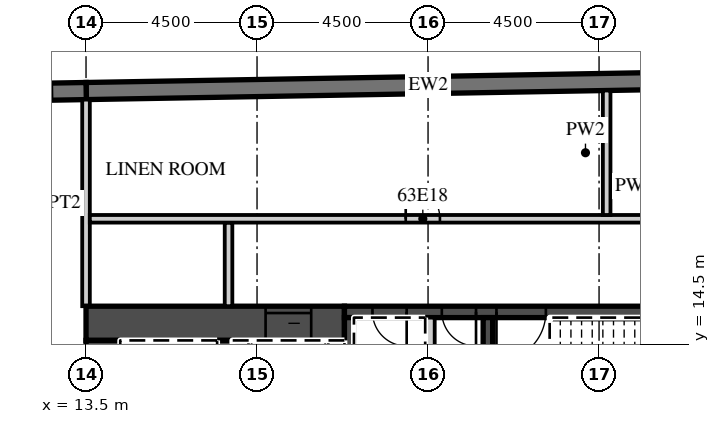
"""IFC4 building model, lengths in metres.
Left out: names, types, materials, properties, quantities, classifications, styles, units other than length and angle.
Written with IfcOpenShell. Run it as: python <this file> out.ifc"""

import sys

from ifc_helpers import new_model, si_unit, direction, frame, frame_2d, origin, place, context, subcontext, project, spatial, rectangle, extrude, element, fill, save


model = new_model("IFC4")
c1 = context("Model", 3, precision=1e-05, world=origin(), true_north=direction((0.0, 1.0)))
c2 = subcontext(c1, "Body", "Model", "MODEL_VIEW")
j1 = project(units=[si_unit("LENGTHUNIT", "METRE"), si_unit("PLANEANGLEUNIT", "RADIAN")], contexts=[c1])
p1 = place(None, origin())
s1 = spatial("IfcSite", under=j1, at=p1, CompositionType="ELEMENT")
p2 = place(p1, origin())
s2 = spatial("IfcBuilding", under=s1, at=p2, CompositionType="ELEMENT")
p3 = place(p2, frame((0.0, 0.0, 254.0)))
s3 = spatial("IfcBuildingStorey", under=s2, at=p3, CompositionType="ELEMENT", Elevation=254.0)
p4 = place(p3, frame((31.504, 21.476, 0.0), z_axis=(0.0, 0.0, 1.0), x_axis=(-0.999847677887, -0.017453395744, 0.0)))
e1 = element("IfcWall", 1, at=p4, inside=s3, PredefinedType="SOLIDWALL", context=c2, shape_type="SweptSolid", body=[
    extrude(rectangle(XDim=18.003, YDim=0.45, at=frame_2d((9.001, 0.0))), origin(), (0.0, 0.0, 1.0), 3.0),
])
p5 = place(p3, frame((13.504, 21.161, 0.0), z_axis=(0.0, 0.0, 1.0), x_axis=(-0.999847763257, -0.017448504532, 0.0)))
e2 = element("IfcWall", 2, at=p5, inside=s3, PredefinedType="SOLIDWALL", context=c2, shape_type="SweptSolid", body=[
    extrude(rectangle(XDim=46.859, YDim=0.45, at=frame_2d((23.43, 0.0))), origin(), (0.0, 0.0, 1.0), 3.0),
])
p6 = place(p5, frame((0.9, 0.0, 0.45)))
e3 = element("IfcOpeningElement", 3, at=p6, cuts=e2, PredefinedType="OPENING", context=c2, shape_type="SweptSolid", body=[
    extrude(rectangle(XDim=2.7, YDim=2.25, at=frame_2d((1.35, 1.125))), frame((0.0, 0.235, 0.0), z_axis=(0.0, -1.0, 0.0), x_axis=(1.0, 0.0, 0.0)), (0.0, 0.0, 1.0), 0.47),
])
p7 = place(p5, frame((5.401, 0.0, 0.45)))
e4 = element("IfcOpeningElement", 4, at=p7, cuts=e2, PredefinedType="OPENING", context=c2, shape_type="SweptSolid", body=[
    extrude(rectangle(XDim=2.7, YDim=2.25, at=frame_2d((1.35, 1.125))), frame((0.0, 0.235, 0.0), z_axis=(0.0, -1.0, 0.0), x_axis=(1.0, 0.0, 0.0)), (0.0, 0.0, 1.0), 0.47),
])
p8 = place(p5, frame((9.902, 0.0, 0.45)))
e5 = element("IfcOpeningElement", 5, at=p8, cuts=e2, PredefinedType="OPENING", context=c2, shape_type="SweptSolid", body=[
    extrude(rectangle(XDim=2.7, YDim=2.25, at=frame_2d((1.35, 1.125))), frame((0.0, 0.235, 0.0), z_axis=(0.0, -1.0, 0.0), x_axis=(1.0, 0.0, 0.0)), (0.0, 0.0, 1.0), 0.47),
])
p9 = place(p5, frame((14.402, 0.0, 0.45)))
e6 = element("IfcOpeningElement", 6, at=p9, cuts=e2, PredefinedType="OPENING", context=c2, shape_type="SweptSolid", body=[
    extrude(rectangle(XDim=2.7, YDim=2.25, at=frame_2d((1.35, 1.125))), frame((0.0, 0.235, 0.0), z_axis=(0.0, -1.0, 0.0), x_axis=(1.0, 0.0, 0.0)), (0.0, 0.0, 1.0), 0.47),
])
p10 = place(p5, frame((18.903, 0.0, 0.45)))
e7 = element("IfcOpeningElement", 7, at=p10, cuts=e2, PredefinedType="OPENING", context=c2, shape_type="SweptSolid", body=[
    extrude(rectangle(XDim=2.7, YDim=2.25, at=frame_2d((1.35, 1.125))), frame((0.0, 0.235, 0.0), z_axis=(0.0, -1.0, 0.0), x_axis=(1.0, 0.0, 0.0)), (0.0, 0.0, 1.0), 0.47),
])
p11 = place(p5, frame((23.404, 0.0, 0.45)))
e8 = element("IfcOpeningElement", 8, at=p11, cuts=e2, PredefinedType="OPENING", context=c2, shape_type="SweptSolid", body=[
    extrude(rectangle(XDim=2.7, YDim=2.25, at=frame_2d((1.35, 1.125))), frame((0.0, 0.235, 0.0), z_axis=(0.0, -1.0, 0.0), x_axis=(1.0, 0.0, 0.0)), (0.0, 0.0, 1.0), 0.47),
])
p12 = place(p5, frame((27.904, 0.0, 0.45)))
e9 = element("IfcOpeningElement", 9, at=p12, cuts=e2, PredefinedType="OPENING", context=c2, shape_type="SweptSolid", body=[
    extrude(rectangle(XDim=2.7, YDim=2.25, at=frame_2d((1.35, 1.125))), frame((0.0, 0.235, 0.0), z_axis=(0.0, -1.0, 0.0), x_axis=(1.0, 0.0, 0.0)), (0.0, 0.0, 1.0), 0.47),
])
p13 = place(p5, frame((32.405, 0.0, 0.45)))
e10 = element("IfcOpeningElement", 10, at=p13, cuts=e2, PredefinedType="OPENING", context=c2, shape_type="SweptSolid", body=[
    extrude(rectangle(XDim=2.7, YDim=2.25, at=frame_2d((1.35, 1.125))), frame((0.0, 0.235, 0.0), z_axis=(0.0, -1.0, 0.0), x_axis=(1.0, 0.0, 0.0)), (0.0, 0.0, 1.0), 0.47),
])
p14 = place(p5, frame((36.906, 0.0, 0.45)))
e11 = element("IfcOpeningElement", 11, at=p14, cuts=e2, PredefinedType="OPENING", context=c2, shape_type="SweptSolid", body=[
    extrude(rectangle(XDim=2.7, YDim=2.25, at=frame_2d((1.35, 1.125))), frame((0.0, 0.235, 0.0), z_axis=(0.0, -1.0, 0.0), x_axis=(1.0, 0.0, 0.0)), (0.0, 0.0, 1.0), 0.47),
])
p15 = place(p5, frame((41.406, 0.0, 0.45)))
e12 = element("IfcOpeningElement", 12, at=p15, cuts=e2, PredefinedType="OPENING", context=c2, shape_type="SweptSolid", body=[
    extrude(rectangle(XDim=2.7, YDim=2.25, at=frame_2d((1.35, 1.125))), frame((0.0, 0.235, 0.0), z_axis=(0.0, -1.0, 0.0), x_axis=(1.0, 0.0, 0.0)), (0.0, 0.0, 1.0), 0.47),
])
p16 = place(p3, frame((13.5, 15.5, 0.0), z_axis=(0.0, 0.0, 1.0), x_axis=(0.0, 1.0, 0.0)))
e13 = element("IfcWall", 13, at=p16, inside=s3, PredefinedType="PARTITIONING", context=c2, shape_type="SweptSolid", body=[
    extrude(rectangle(XDim=5.436, YDim=0.2, at=frame_2d((2.718, 0.0))), origin(), (0.0, 0.0, 1.0), 3.0),
])
p17 = place(p3, frame((13.5, 15.05, 0.0), z_axis=(0.0, 0.0, 1.0), x_axis=(1.0, 0.0, 0.0)))
e14 = element("IfcWall", 14, at=p17, inside=s3, PredefinedType="SHEAR", context=c2, shape_type="SweptSolid", body=[
    extrude(rectangle(XDim=6.8, YDim=0.9, at=frame_2d((3.4, 0.0))), origin(), (0.0, 0.0, 1.0), 3.0),
])
p18 = place(p17, frame((4.725, 0.0, 0.0)))
e15 = element("IfcOpeningElement", 15, at=p18, cuts=e14, PredefinedType="OPENING", context=c2, shape_type="SweptSolid", body=[
    extrude(rectangle(XDim=1.2, YDim=2.1, at=frame_2d((0.6, 1.05))), frame((0.0, 0.46, 0.0), z_axis=(0.0, -1.0, 0.0), x_axis=(1.0, 0.0, 0.0)), (0.0, 0.0, 1.0), 0.92),
])
p19 = place(p3, frame((20.3, 15.35, 0.0), z_axis=(0.0, 0.0, 1.0), x_axis=(1.0, 0.0, 0.0)))
e16 = element("IfcWall", 16, at=p19, inside=s3, PredefinedType="SHEAR", context=c2, shape_type="SweptSolid", body=[
    extrude(rectangle(XDim=10.3, YDim=0.3, at=frame_2d((5.15, 0.0))), origin(), (0.0, 0.0, 1.0), 3.0),
])
p20 = place(p19, frame((4.0, 0.0, 0.0)))
e17 = element("IfcOpeningElement", 17, at=p20, cuts=e16, PredefinedType="OPENING", context=c2, shape_type="SweptSolid", body=[
    extrude(rectangle(XDim=1.3, YDim=2.1, at=frame_2d((0.65, 1.05))), frame((0.0, 0.16, 0.0), z_axis=(0.0, -1.0, 0.0), x_axis=(1.0, 0.0, 0.0)), (0.0, 0.0, 1.0), 0.32),
])
p21 = place(p19, frame((2.562, 0.0, 0.0)))
e18 = element("IfcOpeningElement", 18, at=p21, cuts=e16, PredefinedType="OPENING", context=c2, shape_type="SweptSolid", body=[
    extrude(rectangle(XDim=0.9, YDim=2.1, at=frame_2d((0.45, 1.05))), frame((0.0, 0.16, 0.0), z_axis=(0.0, -1.0, 0.0), x_axis=(1.0, 0.0, 0.0)), (0.0, 0.0, 1.0), 0.32),
])
p22 = place(p19, frame((0.738, 0.0, 0.0)))
e19 = element("IfcOpeningElement", 19, at=p22, cuts=e16, PredefinedType="OPENING", context=c2, shape_type="SweptSolid", body=[
    extrude(rectangle(XDim=0.9, YDim=2.1, at=frame_2d((0.45, 1.05))), frame((0.0, 0.16, 0.0), z_axis=(0.0, -1.0, 0.0), x_axis=(1.0, 0.0, 0.0)), (0.0, 0.0, 1.0), 0.32),
])
p23 = place(p3, frame((13.95, 2.4, 0.0), z_axis=(0.0, 0.0, 1.0), x_axis=(0.0, 1.0, 0.0)))
e20 = element("IfcWall", 20, at=p23, inside=s3, PredefinedType="SHEAR", context=c2, shape_type="SweptSolid", body=[
    extrude(rectangle(XDim=12.2, YDim=0.9, at=frame_2d((6.1, 0.0))), origin(), (0.0, 0.0, 1.0), 3.0),
])
p24 = place(p3, frame((17.15, 8.8, 0.0), z_axis=(0.0, 0.0, 1.0), x_axis=(0.0, 1.0, 0.0)))
e21 = element("IfcWall", 21, at=p24, inside=s3, PredefinedType="SHEAR", context=c2, shape_type="SweptSolid", body=[
    extrude(rectangle(XDim=5.8, YDim=0.4, at=frame_2d((2.9, 0.0))), origin(), (0.0, 0.0, 1.0), 3.0),
])
for number, where, z_axis, x_axis in (
    (22, (20.425, 11.95, 0.0), (0.0, 0.0, 1.0), (0.0, 1.0, 0.0)),
    (23, (24.075, 11.95, 0.0), (0.0, 0.0, 1.0), (0.0, 1.0, 0.0)),
):
    element("IfcWall", number, at=place(p3, frame(where, z_axis=z_axis, x_axis=x_axis)), inside=s3, PredefinedType="SHEAR", context=c2, shape_type="SweptSolid", body=[
        extrude(rectangle(XDim=3.25, YDim=0.25, at=frame_2d((1.625, 0.0))), origin(), (0.0, 0.0, 1.0), 3.0),
    ])
p25 = place(p3, frame((22.55, 11.95, 0.0), z_axis=(0.0, 0.0, 1.0), x_axis=(0.0, 1.0, 0.0)))
e24 = element("IfcWall", 24, at=p25, inside=s3, PredefinedType="PARTITIONING", context=c2, shape_type="SweptSolid", body=[
    extrude(rectangle(XDim=3.25, YDim=0.25, at=frame_2d((1.625, 0.0))), origin(), (0.0, 0.0, 1.0), 3.0),
])
p26 = place(p3, frame((17.25, 15.5, 0.0), z_axis=(0.0, 0.0, 1.0), x_axis=(0.0, 1.0, 0.0)))
e25 = element("IfcWall", 25, at=p26, inside=s3, PredefinedType="PARTITIONING", context=c2, shape_type="SweptSolid", body=[
    extrude(rectangle(XDim=2.2, YDim=0.2, at=frame_2d((1.1, 0.0))), origin(), (0.0, 0.0, 1.0), 3.0),
])
p27 = place(p3, frame((13.6, 17.8, 0.0), z_axis=(0.0, 0.0, 1.0), x_axis=(1.0, 0.0, 0.0)))
e26 = element("IfcWall", 26, at=p27, inside=s3, PredefinedType="PARTITIONING", context=c2, shape_type="SweptSolid", body=[
    extrude(rectangle(XDim=28.657, YDim=0.2, at=frame_2d((14.329, 0.0))), origin(), (0.0, 0.0, 1.0), 3.0),
])
p28 = place(p27, frame((16.613, 0.0, 0.0)))
e27 = element("IfcOpeningElement", 27, at=p28, cuts=e26, PredefinedType="OPENING", context=c2, shape_type="SweptSolid", body=[
    extrude(rectangle(XDim=0.9, YDim=2.1, at=frame_2d((0.45, 1.05))), frame((0.0, 0.11, 0.0), z_axis=(0.0, -1.0, 0.0), x_axis=(1.0, 0.0, 0.0)), (0.0, 0.0, 1.0), 0.22),
])
p29 = place(p27, frame((8.312, 0.0, 0.0)))
e28 = element("IfcOpeningElement", 28, at=p29, cuts=e26, PredefinedType="OPENING", context=c2, shape_type="SweptSolid", body=[
    extrude(rectangle(XDim=0.9, YDim=2.1, at=frame_2d((0.45, 1.05))), frame((0.0, 0.11, 0.0), z_axis=(0.0, -1.0, 0.0), x_axis=(1.0, 0.0, 0.0)), (0.0, 0.0, 1.0), 0.22),
])
p30 = place(p3, frame((27.2, 17.9, 0.0), z_axis=(0.0, 0.0, 1.0), x_axis=(0.0, 1.0, 0.0)))
e29 = element("IfcWall", 29, at=p30, inside=s3, PredefinedType="PARTITIONING", context=c2, shape_type="SweptSolid", body=[
    extrude(rectangle(XDim=3.276, YDim=0.2, at=frame_2d((1.638, 0.0))), origin(), (0.0, 0.0, 1.0), 3.0),
])
p31 = place(p6, origin())
e30 = element("IfcWindow", 30, at=p31, inside=s3, PartitioningType="SINGLE_PANEL", PredefinedType="WINDOW", context=c2, shape_type="SweptSolid", body=[
    extrude(rectangle(XDim=2.7, YDim=2.25, at=frame_2d((1.35, 1.125))), frame((0.0, 0.09, 0.0), z_axis=(0.0, -1.0, 0.0), x_axis=(1.0, 0.0, 0.0)), (0.0, 0.0, 1.0), 0.06),
])
fill(e3, e30)
p32 = place(p18, origin())
e31 = element("IfcDoor", 31, at=p32, inside=s3, OperationType="SLIDING_TO_LEFT", PredefinedType="DOOR", context=c2, shape_type="SweptSolid", body=[
    extrude(rectangle(XDim=1.2, YDim=2.1, at=frame_2d((0.6, 1.05))), frame((0.0, 0.025, 0.0), z_axis=(0.0, -1.0, 0.0), x_axis=(1.0, 0.0, 0.0)), (0.0, 0.0, 1.0), 0.05),
])
fill(e15, e31)
p33 = place(p20, origin())
e32 = element("IfcDoor", 32, at=p33, inside=s3, OperationType="SINGLE_SWING_LEFT", PredefinedType="DOOR", context=c2, shape_type="SweptSolid", body=[
    extrude(rectangle(XDim=1.3, YDim=2.1, at=frame_2d((0.65, 1.05))), frame((0.0, 0.025, 0.0), z_axis=(0.0, -1.0, 0.0), x_axis=(1.0, 0.0, 0.0)), (0.0, 0.0, 1.0), 0.05),
])
fill(e17, e32)
p34 = place(p21, origin())
e33 = element("IfcDoor", 33, at=p34, inside=s3, OperationType="SINGLE_SWING_RIGHT", PredefinedType="DOOR", context=c2, shape_type="SweptSolid", body=[
    extrude(rectangle(XDim=0.9, YDim=2.1, at=frame_2d((0.45, 1.05))), frame((0.0, 0.025, 0.0), z_axis=(0.0, -1.0, 0.0), x_axis=(1.0, 0.0, 0.0)), (0.0, 0.0, 1.0), 0.05),
])
fill(e18, e33)
p35 = place(p22, origin())
e34 = element("IfcDoor", 34, at=p35, inside=s3, OperationType="SINGLE_SWING_RIGHT", PredefinedType="DOOR", context=c2, shape_type="SweptSolid", body=[
    extrude(rectangle(XDim=0.9, YDim=2.1, at=frame_2d((0.45, 1.05))), frame((0.0, 0.025, 0.0), z_axis=(0.0, -1.0, 0.0), x_axis=(1.0, 0.0, 0.0)), (0.0, 0.0, 1.0), 0.05),
])
fill(e19, e34)
p36 = place(p29, origin())
e35 = element("IfcDoor", 35, at=p36, inside=s3, OperationType="SINGLE_SWING_LEFT", PredefinedType="DOOR", context=c2, shape_type="SweptSolid", body=[
    extrude(rectangle(XDim=0.9, YDim=2.1, at=frame_2d((0.45, 1.05))), frame((0.0, 0.025, 0.0), z_axis=(0.0, -1.0, 0.0), x_axis=(1.0, 0.0, 0.0)), (0.0, 0.0, 1.0), 0.05),
])
fill(e28, e35)
save(model, sys.argv[1])
